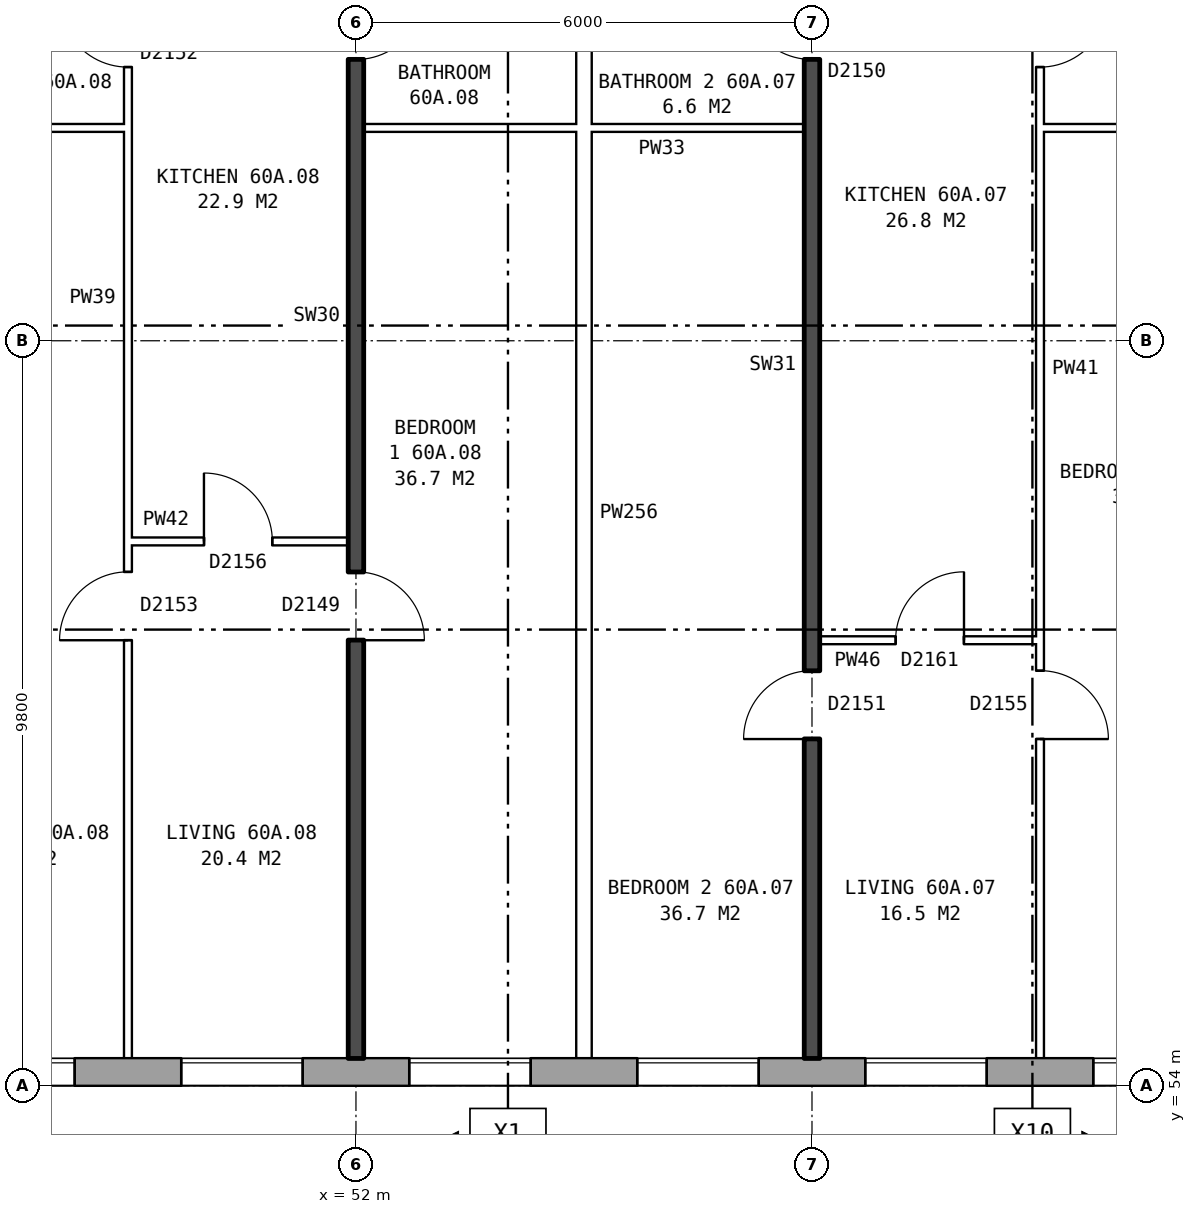
"""IFC4 building model, lengths in metres.
Left out: names, types, materials, properties, quantities, classifications, styles, units other than length and angle.
Written with IfcOpenShell. Run it as: python <this file> out.ifc"""

import sys

from ifc_helpers import new_model, si_unit, direction, frame, frame_2d, origin, place, context, subcontext, project, spatial, rectangle, extrude, element, fill, save


model = new_model("IFC4")
c1 = context("Model", 3, precision=1e-05, world=origin(), true_north=direction((0.0, 1.0)))
c2 = subcontext(c1, "Body", "Model", "MODEL_VIEW")
j1 = project(units=[si_unit("LENGTHUNIT", "METRE"), si_unit("PLANEANGLEUNIT", "RADIAN")], contexts=[c1])
p1 = place(None, origin())
s1 = spatial("IfcSite", under=j1, at=p1, CompositionType="ELEMENT")
p2 = place(p1, origin())
s2 = spatial("IfcBuilding", under=s1, at=p2, CompositionType="ELEMENT")
p3 = place(p2, frame((0.0, 0.0, 212.1)))
s3 = spatial("IfcBuildingStorey", under=s2, at=p3, CompositionType="ELEMENT", Elevation=212.1)
p4 = place(p3, frame((35.075, 54.18, 0.0), z_axis=(0.0, 0.0, 1.0), x_axis=(1.0, 0.0, 0.0)))
e1 = element("IfcWall", 1, at=p4, inside=s3, PredefinedType="STANDARD", context=c2, shape_type="SweptSolid", body=[
    extrude(rectangle(XDim=39.875, YDim=0.36, at=frame_2d((19.938, 0.0))), origin(), (0.0, 0.0, 1.0), 2.85),
])
p5 = place(p4, frame((0.3, 0.0, 0.8)))
e2 = element("IfcOpeningElement", 2, at=p5, cuts=e1, PredefinedType="OPENING", context=c2, shape_type="SweptSolid", body=[
    extrude(rectangle(XDim=0.8, YDim=1.5, at=frame_2d((0.4, 0.75))), frame((0.0, 0.19, 0.0), z_axis=(0.0, -1.0, 0.0), x_axis=(1.0, 0.0, 0.0)), (0.0, 0.0, 1.0), 0.38),
])
p6 = place(p4, frame((5.625, 0.0, 0.8)))
e3 = element("IfcOpeningElement", 3, at=p6, cuts=e1, PredefinedType="OPENING", context=c2, shape_type="SweptSolid", body=[
    extrude(rectangle(XDim=1.6, YDim=1.8, at=frame_2d((0.8, 0.9))), frame((0.0, 0.19, 0.0), z_axis=(0.0, -1.0, 0.0), x_axis=(1.0, 0.0, 0.0)), (0.0, 0.0, 1.0), 0.38),
])
p7 = place(p4, frame((8.625, 0.0, 0.8)))
e4 = element("IfcOpeningElement", 4, at=p7, cuts=e1, PredefinedType="OPENING", context=c2, shape_type="SweptSolid", body=[
    extrude(rectangle(XDim=1.6, YDim=1.8, at=frame_2d((0.8, 0.9))), frame((0.0, 0.19, 0.0), z_axis=(0.0, -1.0, 0.0), x_axis=(1.0, 0.0, 0.0)), (0.0, 0.0, 1.0), 0.38),
])
p8 = place(p4, frame((11.625, 0.0, 0.8)))
e5 = element("IfcOpeningElement", 5, at=p8, cuts=e1, PredefinedType="OPENING", context=c2, shape_type="SweptSolid", body=[
    extrude(rectangle(XDim=1.6, YDim=1.8, at=frame_2d((0.8, 0.9))), frame((0.0, 0.19, 0.0), z_axis=(0.0, -1.0, 0.0), x_axis=(1.0, 0.0, 0.0)), (0.0, 0.0, 1.0), 0.38),
])
p9 = place(p4, frame((14.625, 0.0, 0.8)))
e6 = element("IfcOpeningElement", 6, at=p9, cuts=e1, PredefinedType="OPENING", context=c2, shape_type="SweptSolid", body=[
    extrude(rectangle(XDim=1.6, YDim=1.8, at=frame_2d((0.8, 0.9))), frame((0.0, 0.19, 0.0), z_axis=(0.0, -1.0, 0.0), x_axis=(1.0, 0.0, 0.0)), (0.0, 0.0, 1.0), 0.38),
])
p10 = place(p4, frame((17.625, 0.0, 0.8)))
e7 = element("IfcOpeningElement", 7, at=p10, cuts=e1, PredefinedType="OPENING", context=c2, shape_type="SweptSolid", body=[
    extrude(rectangle(XDim=1.6, YDim=1.8, at=frame_2d((0.8, 0.9))), frame((0.0, 0.19, 0.0), z_axis=(0.0, -1.0, 0.0), x_axis=(1.0, 0.0, 0.0)), (0.0, 0.0, 1.0), 0.38),
])
p11 = place(p4, frame((20.625, 0.0, 0.8)))
e8 = element("IfcOpeningElement", 8, at=p11, cuts=e1, PredefinedType="OPENING", context=c2, shape_type="SweptSolid", body=[
    extrude(rectangle(XDim=1.6, YDim=1.8, at=frame_2d((0.8, 0.9))), frame((0.0, 0.19, 0.0), z_axis=(0.0, -1.0, 0.0), x_axis=(1.0, 0.0, 0.0)), (0.0, 0.0, 1.0), 0.38),
])
p12 = place(p4, frame((23.625, 0.0, 0.8)))
e9 = element("IfcOpeningElement", 9, at=p12, cuts=e1, PredefinedType="OPENING", context=c2, shape_type="SweptSolid", body=[
    extrude(rectangle(XDim=1.6, YDim=1.8, at=frame_2d((0.8, 0.9))), frame((0.0, 0.19, 0.0), z_axis=(0.0, -1.0, 0.0), x_axis=(1.0, 0.0, 0.0)), (0.0, 0.0, 1.0), 0.38),
])
p13 = place(p4, frame((26.625, 0.0, 0.8)))
e10 = element("IfcOpeningElement", 10, at=p13, cuts=e1, PredefinedType="OPENING", context=c2, shape_type="SweptSolid", body=[
    extrude(rectangle(XDim=1.6, YDim=1.8, at=frame_2d((0.8, 0.9))), frame((0.0, 0.19, 0.0), z_axis=(0.0, -1.0, 0.0), x_axis=(1.0, 0.0, 0.0)), (0.0, 0.0, 1.0), 0.38),
])
p14 = place(p4, frame((29.625, 0.0, 0.8)))
e11 = element("IfcOpeningElement", 11, at=p14, cuts=e1, PredefinedType="OPENING", context=c2, shape_type="SweptSolid", body=[
    extrude(rectangle(XDim=1.6, YDim=1.8, at=frame_2d((0.8, 0.9))), frame((0.0, 0.19, 0.0), z_axis=(0.0, -1.0, 0.0), x_axis=(1.0, 0.0, 0.0)), (0.0, 0.0, 1.0), 0.38),
])
p15 = place(p4, frame((31.525, 0.0, 0.8)))
e12 = element("IfcOpeningElement", 12, at=p15, cuts=e1, PredefinedType="OPENING", context=c2, shape_type="SweptSolid", body=[
    extrude(rectangle(XDim=0.8, YDim=1.5, at=frame_2d((0.4, 0.75))), frame((0.0, 0.19, 0.0), z_axis=(0.0, -1.0, 0.0), x_axis=(1.0, 0.0, 0.0)), (0.0, 0.0, 1.0), 0.38),
])
p16 = place(p4, frame((35.625, 0.0, 0.8)))
e13 = element("IfcOpeningElement", 13, at=p16, cuts=e1, PredefinedType="OPENING", context=c2, shape_type="SweptSolid", body=[
    extrude(rectangle(XDim=1.6, YDim=1.8, at=frame_2d((0.8, 0.9))), frame((0.0, 0.19, 0.0), z_axis=(0.0, -1.0, 0.0), x_axis=(1.0, 0.0, 0.0)), (0.0, 0.0, 1.0), 0.38),
])
p17 = place(p4, frame((1.4, 0.0, 0.8)))
e14 = element("IfcOpeningElement", 14, at=p17, cuts=e1, PredefinedType="OPENING", context=c2, shape_type="SweptSolid", body=[
    extrude(rectangle(XDim=1.4, YDim=1.8, at=frame_2d((0.7, 0.9))), frame((0.0, 0.19, 0.0), z_axis=(0.0, -1.0, 0.0), x_axis=(1.0, 0.0, 0.0)), (0.0, 0.0, 1.0), 0.38),
])
p18 = place(p4, frame((33.975, 0.0, 1.7)))
e15 = element("IfcOpeningElement", 15, at=p18, cuts=e1, PredefinedType="OPENING", context=c2, shape_type="SweptSolid", body=[
    extrude(rectangle(XDim=0.6, YDim=0.9, at=frame_2d((0.3, 0.45))), frame((0.0, 0.19, 0.0), z_axis=(0.0, -1.0, 0.0), x_axis=(1.0, 0.0, 0.0)), (0.0, 0.0, 1.0), 0.38),
])
p19 = place(p3, frame((58.1, 59.86, 0.0), z_axis=(0.0, 0.0, 1.0), x_axis=(1.0, 0.0, 0.0)))
e16 = element("IfcWall", 16, at=p19, inside=s3, PredefinedType="PARTITIONING", context=c2, shape_type="SweptSolid", body=[
    extrude(rectangle(XDim=2.9, YDim=0.1, at=frame_2d((1.45, 0.0))), origin(), (0.0, 0.0, 1.0), 2.85),
])
p20 = place(p19, frame((1.0, 0.0, 0.0)))
e17 = element("IfcOpeningElement", 17, at=p20, cuts=e16, PredefinedType="OPENING", context=c2, shape_type="SweptSolid", body=[
    extrude(rectangle(XDim=0.9, YDim=2.1, at=frame_2d((0.45, 1.05))), frame((0.0, 0.06, 0.0), z_axis=(0.0, -1.0, 0.0), x_axis=(1.0, 0.0, 0.0)), (0.0, 0.0, 1.0), 0.12),
])
p21 = place(p3, frame((49.0, 61.16, 0.0), z_axis=(0.0, 0.0, 1.0), x_axis=(1.0, 0.0, 0.0)))
e18 = element("IfcWall", 18, at=p21, inside=s3, PredefinedType="PARTITIONING", context=c2, shape_type="SweptSolid", body=[
    extrude(rectangle(XDim=2.9, YDim=0.1, at=frame_2d((1.45, 0.0))), origin(), (0.0, 0.0, 1.0), 2.85),
])
p22 = place(p21, frame((1.0, 0.0, 0.0)))
e19 = element("IfcOpeningElement", 19, at=p22, cuts=e18, PredefinedType="OPENING", context=c2, shape_type="SweptSolid", body=[
    extrude(rectangle(XDim=0.9, YDim=2.1, at=frame_2d((0.45, 1.05))), frame((0.0, 0.06, 0.0), z_axis=(0.0, -1.0, 0.0), x_axis=(1.0, 0.0, 0.0)), (0.0, 0.0, 1.0), 0.12),
])
p23 = place(p3, frame((46.1, 66.6, 0.0), z_axis=(0.0, 0.0, 1.0), x_axis=(1.0, 0.0, 0.0)))
e20 = element("IfcWall", 20, at=p23, inside=s3, PredefinedType="PARTITIONING", context=c2, shape_type="SweptSolid", body=[
    extrude(rectangle(XDim=2.9, YDim=0.1, at=frame_2d((1.45, 0.0))), origin(), (0.0, 0.0, 1.0), 2.85),
])
p24 = place(p3, frame((52.1, 66.6, 0.0), z_axis=(0.0, 0.0, 1.0), x_axis=(1.0, 0.0, 0.0)))
e21 = element("IfcWall", 21, at=p24, inside=s3, PredefinedType="PARTITIONING", context=c2, shape_type="SweptSolid", body=[
    extrude(rectangle(XDim=5.8, YDim=0.1, at=frame_2d((2.9, 0.0))), origin(), (0.0, 0.0, 1.0), 2.85),
])
p25 = place(p3, frame((61.0, 66.6, 0.0), z_axis=(0.0, 0.0, 1.0), x_axis=(1.0, 0.0, 0.0)))
e22 = element("IfcWall", 22, at=p25, inside=s3, PredefinedType="PARTITIONING", context=c2, shape_type="SweptSolid", body=[
    extrude(rectangle(XDim=2.64, YDim=0.1, at=frame_2d((1.32, 0.0))), origin(), (0.0, 0.0, 1.0), 2.85),
])
p26 = place(p3, frame((49.0, 54.36, 0.0), z_axis=(0.0, 0.0, 1.0), x_axis=(0.0, 1.0, 0.0)))
e23 = element("IfcWall", 23, at=p26, inside=s3, PredefinedType="PARTITIONING", context=c2, shape_type="SweptSolid", body=[
    extrude(rectangle(XDim=14.34, YDim=0.1, at=frame_2d((7.17, 0.0))), origin(), (0.0, 0.0, 1.0), 2.85),
])
p27 = place(p26, frame((5.5, 0.0, 0.0)))
e24 = element("IfcOpeningElement", 24, at=p27, cuts=e23, PredefinedType="OPENING", context=c2, shape_type="SweptSolid", body=[
    extrude(rectangle(XDim=0.9, YDim=2.1, at=frame_2d((0.45, 1.05))), frame((0.0, 0.06, 0.0), z_axis=(0.0, -1.0, 0.0), x_axis=(1.0, 0.0, 0.0)), (0.0, 0.0, 1.0), 0.12),
])
p28 = place(p26, frame((13.04, 0.0, 0.0)))
e25 = element("IfcOpeningElement", 25, at=p28, cuts=e23, PredefinedType="OPENING", context=c2, shape_type="SweptSolid", body=[
    extrude(rectangle(XDim=0.9, YDim=2.1, at=frame_2d((0.45, 1.05))), frame((0.0, 0.06, 0.0), z_axis=(0.0, -1.0, 0.0), x_axis=(1.0, 0.0, 0.0)), (0.0, 0.0, 1.0), 0.12),
])
p29 = place(p3, frame((52.0, 54.36, 0.0), z_axis=(0.0, 0.0, 1.0), x_axis=(0.0, 1.0, 0.0)))
e26 = element("IfcWall", 26, at=p29, inside=s3, PredefinedType="SOLIDWALL", context=c2, shape_type="SweptSolid", body=[
    extrude(rectangle(XDim=14.44, YDim=0.2, at=frame_2d((7.22, 0.0))), origin(), (0.0, 0.0, 1.0), 2.85),
])
p30 = place(p29, frame((5.5, 0.0, 0.0)))
e27 = element("IfcOpeningElement", 27, at=p30, cuts=e26, PredefinedType="OPENING", context=c2, shape_type="SweptSolid", body=[
    extrude(rectangle(XDim=0.9, YDim=2.1, at=frame_2d((0.45, 1.05))), frame((0.0, 0.11, 0.0), z_axis=(0.0, -1.0, 0.0), x_axis=(1.0, 0.0, 0.0)), (0.0, 0.0, 1.0), 0.22),
])
p31 = place(p29, frame((13.14, 0.0, 0.0)))
e28 = element("IfcOpeningElement", 28, at=p31, cuts=e26, PredefinedType="OPENING", context=c2, shape_type="SweptSolid", body=[
    extrude(rectangle(XDim=0.9, YDim=2.1, at=frame_2d((0.45, 1.05))), frame((0.0, 0.11, 0.0), z_axis=(0.0, -1.0, 0.0), x_axis=(1.0, 0.0, 0.0)), (0.0, 0.0, 1.0), 0.22),
])
p32 = place(p3, frame((55.0, 54.36, 0.0), z_axis=(0.0, 0.0, 1.0), x_axis=(0.0, 1.0, 0.0)))
e29 = element("IfcWall", 29, at=p32, inside=s3, PredefinedType="PARTITIONING", context=c2, shape_type="SweptSolid", body=[
    extrude(rectangle(XDim=14.34, YDim=0.2, at=frame_2d((7.17, 0.0))), origin(), (0.0, 0.0, 1.0), 2.85),
])
p33 = place(p3, frame((58.0, 54.36, 0.0), z_axis=(0.0, 0.0, 1.0), x_axis=(0.0, 1.0, 0.0)))
e30 = element("IfcWall", 30, at=p33, inside=s3, PredefinedType="SOLIDWALL", context=c2, shape_type="SweptSolid", body=[
    extrude(rectangle(XDim=14.44, YDim=0.2, at=frame_2d((7.22, 0.0))), origin(), (0.0, 0.0, 1.0), 2.85),
])
p34 = place(p33, frame((4.2, 0.0, 0.0)))
e31 = element("IfcOpeningElement", 31, at=p34, cuts=e30, PredefinedType="OPENING", context=c2, shape_type="SweptSolid", body=[
    extrude(rectangle(XDim=0.9, YDim=2.1, at=frame_2d((0.45, 1.05))), frame((0.0, 0.11, 0.0), z_axis=(0.0, -1.0, 0.0), x_axis=(1.0, 0.0, 0.0)), (0.0, 0.0, 1.0), 0.22),
])
p35 = place(p33, frame((13.14, 0.0, 0.0)))
e32 = element("IfcOpeningElement", 32, at=p35, cuts=e30, PredefinedType="OPENING", context=c2, shape_type="SweptSolid", body=[
    extrude(rectangle(XDim=0.9, YDim=2.1, at=frame_2d((0.45, 1.05))), frame((0.0, 0.11, 0.0), z_axis=(0.0, -1.0, 0.0), x_axis=(1.0, 0.0, 0.0)), (0.0, 0.0, 1.0), 0.22),
])
p36 = place(p3, frame((61.0, 54.36, 0.0), z_axis=(0.0, 0.0, 1.0), x_axis=(0.0, 1.0, 0.0)))
e33 = element("IfcWall", 33, at=p36, inside=s3, PredefinedType="PARTITIONING", context=c2, shape_type="SweptSolid", body=[
    extrude(rectangle(XDim=14.34, YDim=0.1, at=frame_2d((7.17, 0.0))), origin(), (0.0, 0.0, 1.0), 2.85),
])
p37 = place(p36, frame((4.2, 0.0, 0.0)))
e34 = element("IfcOpeningElement", 34, at=p37, cuts=e33, PredefinedType="OPENING", context=c2, shape_type="SweptSolid", body=[
    extrude(rectangle(XDim=0.9, YDim=2.1, at=frame_2d((0.45, 1.05))), frame((0.0, 0.06, 0.0), z_axis=(0.0, -1.0, 0.0), x_axis=(1.0, 0.0, 0.0)), (0.0, 0.0, 1.0), 0.12),
])
p38 = place(p36, frame((13.04, 0.0, 0.0)))
e35 = element("IfcOpeningElement", 35, at=p38, cuts=e33, PredefinedType="OPENING", context=c2, shape_type="SweptSolid", body=[
    extrude(rectangle(XDim=0.9, YDim=2.1, at=frame_2d((0.45, 1.05))), frame((0.0, 0.06, 0.0), z_axis=(0.0, -1.0, 0.0), x_axis=(1.0, 0.0, 0.0)), (0.0, 0.0, 1.0), 0.12),
])
p39 = place(p8, origin())
e36 = element("IfcWindow", 36, at=p39, inside=s3, PartitioningType="SINGLE_PANEL", PredefinedType="WINDOW", context=c2, shape_type="SweptSolid", body=[
    extrude(rectangle(XDim=1.6, YDim=1.8, at=frame_2d((0.8, 0.9))), frame((0.0, 0.15, 0.0), z_axis=(0.0, -1.0, 0.0), x_axis=(1.0, 0.0, 0.0)), (0.0, 0.0, 1.0), 0.06),
])
fill(e5, e36)
p40 = place(p9, origin())
e37 = element("IfcWindow", 37, at=p40, inside=s3, PartitioningType="SINGLE_PANEL", PredefinedType="WINDOW", context=c2, shape_type="SweptSolid", body=[
    extrude(rectangle(XDim=1.6, YDim=1.8, at=frame_2d((0.8, 0.9))), frame((0.0, 0.15, 0.0), z_axis=(0.0, -1.0, 0.0), x_axis=(1.0, 0.0, 0.0)), (0.0, 0.0, 1.0), 0.06),
])
fill(e6, e37)
p41 = place(p10, origin())
e38 = element("IfcWindow", 38, at=p41, inside=s3, PartitioningType="SINGLE_PANEL", PredefinedType="WINDOW", context=c2, shape_type="SweptSolid", body=[
    extrude(rectangle(XDim=1.6, YDim=1.8, at=frame_2d((0.8, 0.9))), frame((0.0, 0.15, 0.0), z_axis=(0.0, -1.0, 0.0), x_axis=(1.0, 0.0, 0.0)), (0.0, 0.0, 1.0), 0.06),
])
fill(e7, e38)
p42 = place(p11, origin())
e39 = element("IfcWindow", 39, at=p42, inside=s3, PartitioningType="SINGLE_PANEL", PredefinedType="WINDOW", context=c2, shape_type="SweptSolid", body=[
    extrude(rectangle(XDim=1.6, YDim=1.8, at=frame_2d((0.8, 0.9))), frame((0.0, 0.15, 0.0), z_axis=(0.0, -1.0, 0.0), x_axis=(1.0, 0.0, 0.0)), (0.0, 0.0, 1.0), 0.06),
])
fill(e8, e39)
p43 = place(p12, origin())
e40 = element("IfcWindow", 40, at=p43, inside=s3, PartitioningType="SINGLE_PANEL", PredefinedType="WINDOW", context=c2, shape_type="SweptSolid", body=[
    extrude(rectangle(XDim=1.6, YDim=1.8, at=frame_2d((0.8, 0.9))), frame((0.0, 0.15, 0.0), z_axis=(0.0, -1.0, 0.0), x_axis=(1.0, 0.0, 0.0)), (0.0, 0.0, 1.0), 0.06),
])
fill(e9, e40)
p44 = place(p13, origin())
e41 = element("IfcWindow", 41, at=p44, inside=s3, PartitioningType="SINGLE_PANEL", PredefinedType="WINDOW", context=c2, shape_type="SweptSolid", body=[
    extrude(rectangle(XDim=1.6, YDim=1.8, at=frame_2d((0.8, 0.9))), frame((0.0, 0.15, 0.0), z_axis=(0.0, -1.0, 0.0), x_axis=(1.0, 0.0, 0.0)), (0.0, 0.0, 1.0), 0.06),
])
fill(e10, e41)
p45 = place(p37, frame((0.9, 0.0, 0.0), z_axis=(0.0, 0.0, 1.0), x_axis=(-1.0, 0.0, 0.0)))
e42 = element("IfcDoor", 42, at=p45, inside=s3, OperationType="SINGLE_SWING_RIGHT", PredefinedType="DOOR", context=c2, shape_type="SweptSolid", body=[
    extrude(rectangle(XDim=0.9, YDim=2.1, at=frame_2d((0.45, 1.05))), frame((0.0, 0.025, 0.0), z_axis=(0.0, -1.0, 0.0), x_axis=(1.0, 0.0, 0.0)), (0.0, 0.0, 1.0), 0.05),
])
fill(e34, e42)
p46 = place(p34, origin())
e43 = element("IfcDoor", 43, at=p46, inside=s3, OperationType="SINGLE_SWING_LEFT", PredefinedType="DOOR", context=c2, shape_type="SweptSolid", body=[
    extrude(rectangle(XDim=0.9, YDim=2.1, at=frame_2d((0.45, 1.05))), frame((0.0, 0.025, 0.0), z_axis=(0.0, -1.0, 0.0), x_axis=(1.0, 0.0, 0.0)), (0.0, 0.0, 1.0), 0.05),
])
fill(e31, e43)
p47 = place(p20, origin())
e44 = element("IfcDoor", 44, at=p47, inside=s3, OperationType="SINGLE_SWING_RIGHT", PredefinedType="DOOR", context=c2, shape_type="SweptSolid", body=[
    extrude(rectangle(XDim=0.9, YDim=2.1, at=frame_2d((0.45, 1.05))), frame((0.0, 0.025, 0.0), z_axis=(0.0, -1.0, 0.0), x_axis=(1.0, 0.0, 0.0)), (0.0, 0.0, 1.0), 0.05),
])
fill(e17, e44)
p48 = place(p38, frame((0.9, 0.0, 0.0), z_axis=(0.0, 0.0, 1.0), x_axis=(-1.0, 0.0, 0.0)))
e45 = element("IfcDoor", 45, at=p48, inside=s3, OperationType="SINGLE_SWING_LEFT", PredefinedType="DOOR", context=c2, shape_type="SweptSolid", body=[
    extrude(rectangle(XDim=0.9, YDim=2.1, at=frame_2d((0.45, 1.05))), frame((0.0, 0.025, 0.0), z_axis=(0.0, -1.0, 0.0), x_axis=(1.0, 0.0, 0.0)), (0.0, 0.0, 1.0), 0.05),
])
fill(e35, e45)
p49 = place(p35, origin())
e46 = element("IfcDoor", 46, at=p49, inside=s3, OperationType="SINGLE_SWING_RIGHT", PredefinedType="DOOR", context=c2, shape_type="SweptSolid", body=[
    extrude(rectangle(XDim=0.9, YDim=2.1, at=frame_2d((0.45, 1.05))), frame((0.0, 0.025, 0.0), z_axis=(0.0, -1.0, 0.0), x_axis=(1.0, 0.0, 0.0)), (0.0, 0.0, 1.0), 0.05),
])
fill(e32, e46)
p50 = place(p30, frame((0.9, 0.0, 0.0), z_axis=(0.0, 0.0, 1.0), x_axis=(-1.0, 0.0, 0.0)))
e47 = element("IfcDoor", 47, at=p50, inside=s3, OperationType="SINGLE_SWING_RIGHT", PredefinedType="DOOR", context=c2, shape_type="SweptSolid", body=[
    extrude(rectangle(XDim=0.9, YDim=2.1, at=frame_2d((0.45, 1.05))), frame((0.0, 0.025, 0.0), z_axis=(0.0, -1.0, 0.0), x_axis=(1.0, 0.0, 0.0)), (0.0, 0.0, 1.0), 0.05),
])
fill(e27, e47)
p51 = place(p27, origin())
e48 = element("IfcDoor", 48, at=p51, inside=s3, OperationType="SINGLE_SWING_LEFT", PredefinedType="DOOR", context=c2, shape_type="SweptSolid", body=[
    extrude(rectangle(XDim=0.9, YDim=2.1, at=frame_2d((0.45, 1.05))), frame((0.0, 0.025, 0.0), z_axis=(0.0, -1.0, 0.0), x_axis=(1.0, 0.0, 0.0)), (0.0, 0.0, 1.0), 0.05),
])
fill(e24, e48)
p52 = place(p22, origin())
e49 = element("IfcDoor", 49, at=p52, inside=s3, OperationType="SINGLE_SWING_LEFT", PredefinedType="DOOR", context=c2, shape_type="SweptSolid", body=[
    extrude(rectangle(XDim=0.9, YDim=2.1, at=frame_2d((0.45, 1.05))), frame((0.0, 0.025, 0.0), z_axis=(0.0, -1.0, 0.0), x_axis=(1.0, 0.0, 0.0)), (0.0, 0.0, 1.0), 0.05),
])
fill(e19, e49)
p53 = place(p31, frame((0.9, 0.0, 0.0), z_axis=(0.0, 0.0, 1.0), x_axis=(-1.0, 0.0, 0.0)))
e50 = element("IfcDoor", 50, at=p53, inside=s3, OperationType="SINGLE_SWING_LEFT", PredefinedType="DOOR", context=c2, shape_type="SweptSolid", body=[
    extrude(rectangle(XDim=0.9, YDim=2.1, at=frame_2d((0.45, 1.05))), frame((0.0, 0.025, 0.0), z_axis=(0.0, -1.0, 0.0), x_axis=(1.0, 0.0, 0.0)), (0.0, 0.0, 1.0), 0.05),
])
fill(e28, e50)
p54 = place(p28, origin())
e51 = element("IfcDoor", 51, at=p54, inside=s3, OperationType="SINGLE_SWING_RIGHT", PredefinedType="DOOR", context=c2, shape_type="SweptSolid", body=[
    extrude(rectangle(XDim=0.9, YDim=2.1, at=frame_2d((0.45, 1.05))), frame((0.0, 0.025, 0.0), z_axis=(0.0, -1.0, 0.0), x_axis=(1.0, 0.0, 0.0)), (0.0, 0.0, 1.0), 0.05),
])
fill(e25, e51)
save(model, sys.argv[1])
